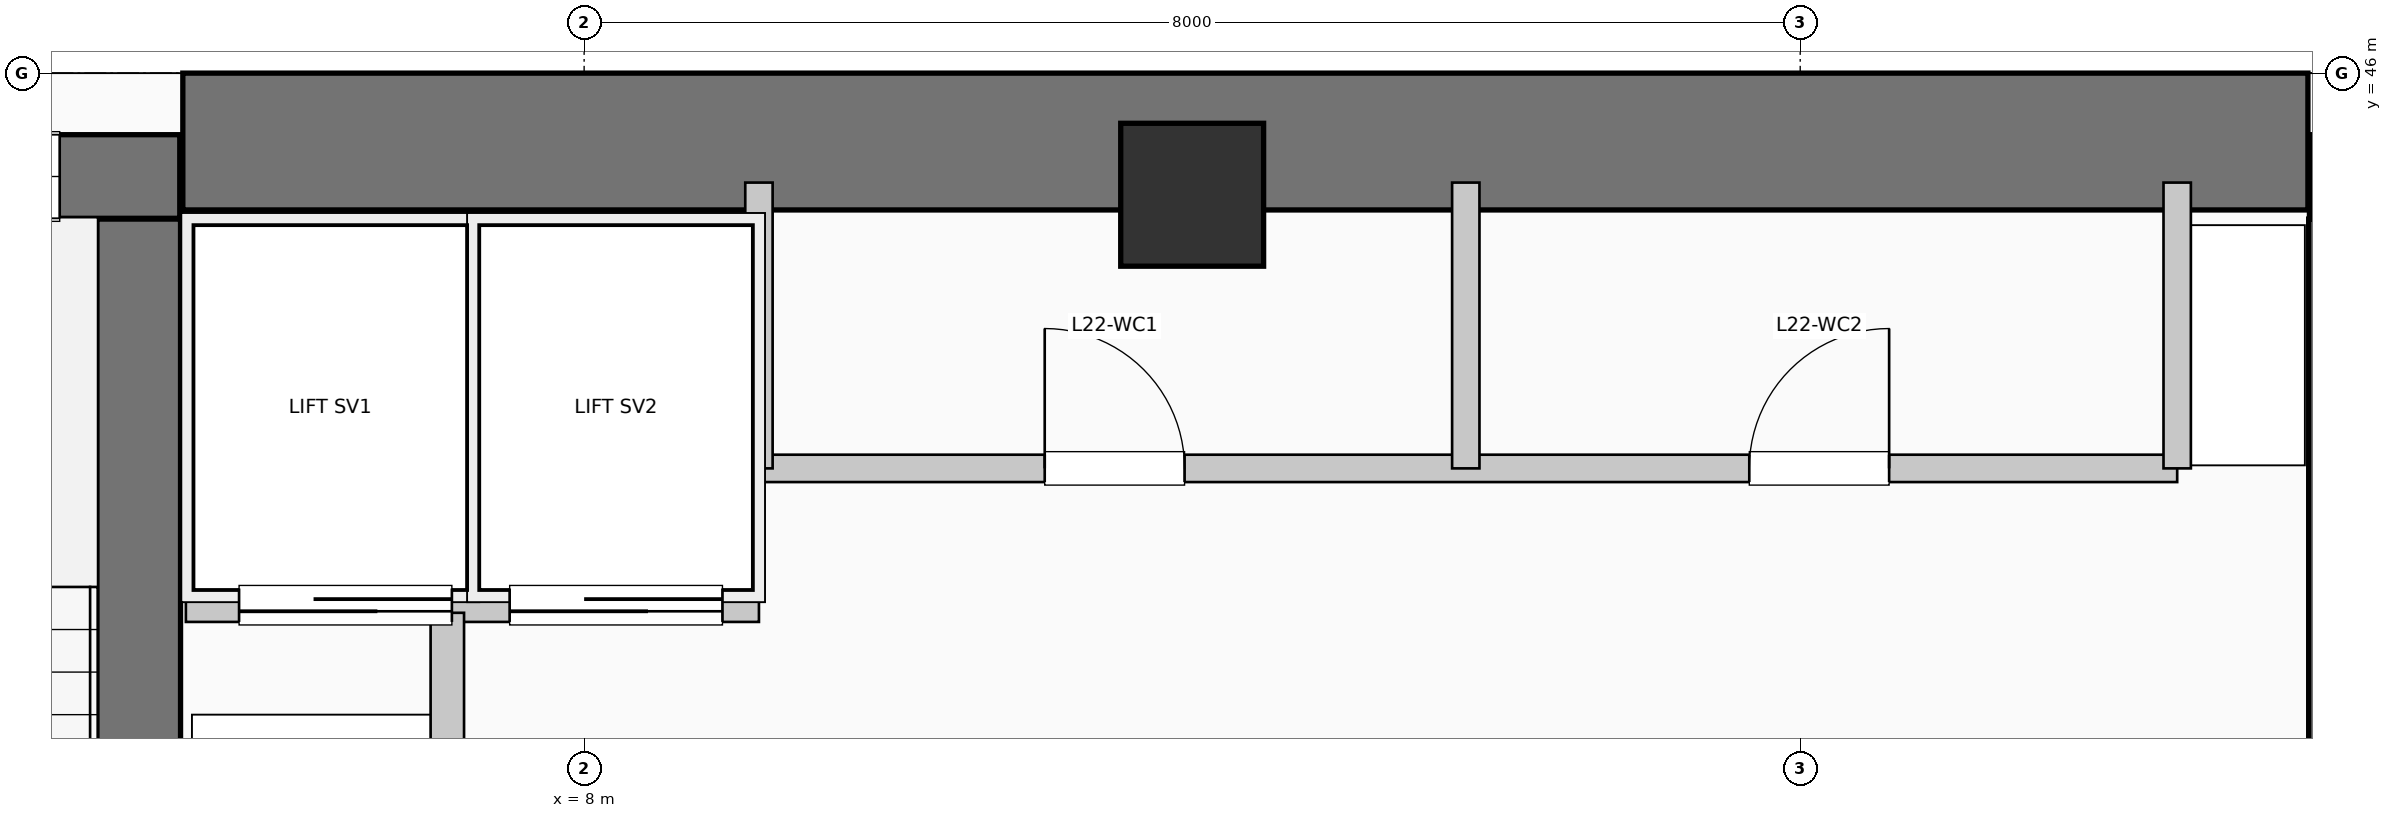
"""IFC4 building model, lengths in metres.
Left out: names, types, materials, properties, quantities, classifications, styles, units other than length and angle.
Written with IfcOpenShell. Run it as: python <this file> out.ifc"""

import sys

from ifc_helpers import new_model, si_unit, direction, frame, frame_2d, origin, origin_2d, place, context, subcontext, project, spatial, rectangle, extrude, element, fill, save


model = new_model("IFC4")
c1 = context("Model", 3, precision=1e-05, world=origin(), true_north=direction((0.0, 1.0)))
c2 = subcontext(c1, "Body", "Model", "MODEL_VIEW")
j1 = project(units=[si_unit("LENGTHUNIT", "METRE"), si_unit("PLANEANGLEUNIT", "RADIAN")], contexts=[c1])
p1 = place(None, origin())
s1 = spatial("IfcSite", under=j1, at=p1, CompositionType="ELEMENT")
p2 = place(p1, origin())
s2 = spatial("IfcBuilding", under=s1, at=p2, CompositionType="ELEMENT")
p3 = place(p2, frame((0.0, 0.0, 93.72)))
s3 = spatial("IfcBuildingStorey", under=s2, at=p3, CompositionType="ELEMENT", Elevation=93.72)
p4 = place(p3, frame((5.36, 45.55, 0.0), z_axis=(0.0, 0.0, 1.0), x_axis=(1.0, 0.0, 0.0)))
e1 = element("IfcWall", 1, at=p4, inside=s3, PredefinedType="SHEAR", context=c2, shape_type="SweptSolid", body=[
    extrude(rectangle(XDim=13.98, YDim=0.9, at=frame_2d((6.99, 0.0))), origin(), (0.0, 0.0, 1.0), 4.95),
])
p5 = place(p3, frame((5.07, 37.15, 0.0), z_axis=(0.0, 0.0, 1.0), x_axis=(0.0, 1.0, 0.0)))
e2 = element("IfcWall", 2, at=p5, inside=s3, PredefinedType="SHEAR", context=c2, shape_type="SweptSolid", body=[
    extrude(rectangle(XDim=7.89, YDim=0.55, at=frame_2d((3.945, 0.0))), origin(), (0.0, 0.0, 1.0), 4.95),
])
p6 = place(p3, frame((1.1, 45.32, 0.0), z_axis=(0.0, 0.0, 1.0), x_axis=(1.0, 0.0, 0.0)))
e3 = element("IfcWall", 3, at=p6, inside=s3, PredefinedType="SHEAR", context=c2, shape_type="SweptSolid", body=[
    extrude(rectangle(XDim=4.24, YDim=0.55, at=frame_2d((2.12, 0.0))), origin(), (0.0, 0.0, 1.0), 4.95),
])
p7 = place(p6, frame((2.05, 0.0, 1.05)))
e4 = element("IfcOpeningElement", 4, at=p7, cuts=e3, PredefinedType="OPENING", context=c2, shape_type="SweptSolid", body=[
    extrude(rectangle(XDim=1.4, YDim=1.8, at=frame_2d((0.7, 0.9))), frame((0.0, 0.285, 0.0), z_axis=(0.0, -1.0, 0.0), x_axis=(1.0, 0.0, 0.0)), (0.0, 0.0, 1.0), 0.57),
])
p8 = place(p3, frame((19.62, 37.15, 0.0), z_axis=(0.0, 0.0, 1.0), x_axis=(0.0, 1.0, 0.0)))
e5 = element("IfcWall", 5, at=p8, inside=s3, PredefinedType="SHEAR", context=c2, shape_type="SweptSolid", body=[
    extrude(rectangle(XDim=7.89, YDim=0.55, at=frame_2d((3.945, 0.0))), origin(), (0.0, 0.0, 1.0), 4.95),
])
p9 = place(p3, frame((19.35, 45.32, 0.0), z_axis=(0.0, 0.0, 1.0), x_axis=(1.0, 0.0, 0.0)))
e6 = element("IfcWall", 6, at=p9, inside=s3, PredefinedType="SHEAR", context=c2, shape_type="SweptSolid", body=[
    extrude(rectangle(XDim=3.69, YDim=0.55, at=frame_2d((1.845, 0.0))), origin(), (0.0, 0.0, 1.0), 4.95),
])
p10 = place(p9, frame((1.15, 0.0, 1.05)))
e7 = element("IfcOpeningElement", 7, at=p10, cuts=e6, PredefinedType="OPENING", context=c2, shape_type="SweptSolid", body=[
    extrude(rectangle(XDim=1.4, YDim=1.8, at=frame_2d((0.7, 0.9))), frame((0.0, 0.285, 0.0), z_axis=(0.0, -1.0, 0.0), x_axis=(1.0, 0.0, 0.0)), (0.0, 0.0, 1.0), 0.57),
])
p11 = place(p3, frame((12.0, 45.2, 0.0), z_axis=(0.0, 0.0, 1.0), x_axis=(1.0, 0.0, 0.0)))
e8 = element("IfcColumn", 8, at=p11, inside=s3, PredefinedType="COLUMN", context=c2, shape_type="SweptSolid", body=[
    extrude(rectangle(XDim=0.94, YDim=0.94, at=origin_2d()), origin(), (0.0, 0.0, 1.0), 4.95),
])
p12 = place(p3, frame((5.38, 42.5, 0.0), z_axis=(0.0, 0.0, 1.0), x_axis=(1.0, 0.0, 0.0)))
e9 = element("IfcWall", 9, at=p12, inside=s3, PredefinedType="PARTITIONING", context=c2, shape_type="SweptSolid", body=[
    extrude(rectangle(XDim=3.77, YDim=0.22, at=frame_2d((1.885, 0.0))), origin(), (0.0, 0.0, 1.0), 4.7),
])
p13 = place(p12, frame((1.75, 0.0, 0.0), z_axis=(0.0, 0.0, 1.0), x_axis=(-1.0, 0.0, 0.0)))
e10 = element("IfcOpeningElement", 10, at=p13, cuts=e9, PredefinedType="OPENING", context=c2, shape_type="SweptSolid", body=[
    extrude(rectangle(XDim=1.4, YDim=2.2, at=frame_2d((0.7, 1.1))), frame((0.0, 0.12, 0.0), z_axis=(0.0, -1.0, 0.0), x_axis=(1.0, 0.0, 0.0)), (0.0, 0.0, 1.0), 0.24),
])
p14 = place(p12, frame((3.53, 0.0, 0.0), z_axis=(0.0, 0.0, 1.0), x_axis=(-1.0, 0.0, 0.0)))
e11 = element("IfcOpeningElement", 11, at=p14, cuts=e9, PredefinedType="OPENING", context=c2, shape_type="SweptSolid", body=[
    extrude(rectangle(XDim=1.4, YDim=2.2, at=frame_2d((0.7, 1.1))), frame((0.0, 0.12, 0.0), z_axis=(0.0, -1.0, 0.0), x_axis=(1.0, 0.0, 0.0)), (0.0, 0.0, 1.0), 0.24),
])
p15 = place(p3, frame((7.1, 39.52, 0.0), z_axis=(0.0, 0.0, 1.0), x_axis=(0.0, 1.0, 0.0)))
e12 = element("IfcWall", 12, at=p15, inside=s3, PredefinedType="PARTITIONING", context=c2, shape_type="SweptSolid", body=[
    extrude(rectangle(XDim=2.93, YDim=0.22, at=frame_2d((1.465, 0.0))), origin(), (0.0, 0.0, 1.0), 4.7),
])
p16 = place(p3, frame((9.15, 43.4, 0.0), z_axis=(0.0, 0.0, 1.0), x_axis=(1.0, 0.0, 0.0)))
e13 = element("IfcWall", 13, at=p16, inside=s3, PredefinedType="PLUMBINGWALL", context=c2, shape_type="SweptSolid", body=[
    extrude(rectangle(XDim=9.33, YDim=0.18, at=frame_2d((4.665, 0.0))), origin(), (0.0, 0.0, 1.0), 4.7),
])
p17 = place(p16, frame((1.88, 0.0, 0.0)))
e14 = element("IfcOpeningElement", 14, at=p17, cuts=e13, PredefinedType="OPENING", context=c2, shape_type="SweptSolid", body=[
    extrude(rectangle(XDim=0.92, YDim=2.1, at=frame_2d((0.46, 1.05))), frame((0.0, 0.1, 0.0), z_axis=(0.0, -1.0, 0.0), x_axis=(1.0, 0.0, 0.0)), (0.0, 0.0, 1.0), 0.2),
])
p18 = place(p16, frame((6.515, 0.0, 0.0)))
e15 = element("IfcOpeningElement", 15, at=p18, cuts=e13, PredefinedType="OPENING", context=c2, shape_type="SweptSolid", body=[
    extrude(rectangle(XDim=0.92, YDim=2.1, at=frame_2d((0.46, 1.05))), frame((0.0, 0.1, 0.0), z_axis=(0.0, -1.0, 0.0), x_axis=(1.0, 0.0, 0.0)), (0.0, 0.0, 1.0), 0.2),
])
for number, where, z_axis, x_axis in (
    (16, (9.15, 43.4, 0.0), (0.0, 0.0, 1.0), (0.0, 1.0, 0.0)),
    (17, (18.48, 43.4, 0.0), (0.0, 0.0, 1.0), (0.0, 1.0, 0.0)),
    (18, (13.8, 43.4, 0.0), (0.0, 0.0, 1.0), (0.0, 1.0, 0.0)),
):
    element("IfcWall", number, at=place(p3, frame(where, z_axis=z_axis, x_axis=x_axis)), inside=s3, PredefinedType="PLUMBINGWALL", context=c2, shape_type="SweptSolid", body=[
        extrude(rectangle(XDim=1.88, YDim=0.18, at=frame_2d((0.94, 0.0))), origin(), (0.0, 0.0, 1.0), 4.7),
    ])
p19 = place(p7, origin())
e19 = element("IfcWindow", 19, at=p19, inside=s3, PartitioningType="SINGLE_PANEL", PredefinedType="WINDOW", context=c2, shape_type="SweptSolid", body=[
    extrude(rectangle(XDim=1.4, YDim=1.8, at=frame_2d((0.7, 0.9))), frame((0.0, 0.03, 0.0), z_axis=(0.0, -1.0, 0.0), x_axis=(1.0, 0.0, 0.0)), (0.0, 0.0, 1.0), 0.06),
])
fill(e4, e19)
p20 = place(p13, origin())
e20 = element("IfcDoor", 20, at=p20, inside=s3, OperationType="SLIDING_TO_LEFT", PredefinedType="DOOR", context=c2, shape_type="SweptSolid", body=[
    extrude(rectangle(XDim=1.4, YDim=2.2, at=frame_2d((0.7, 1.1))), frame((0.0, 0.025, 0.0), z_axis=(0.0, -1.0, 0.0), x_axis=(1.0, 0.0, 0.0)), (0.0, 0.0, 1.0), 0.05),
])
fill(e10, e20)
p21 = place(p14, origin())
e21 = element("IfcDoor", 21, at=p21, inside=s3, OperationType="SLIDING_TO_LEFT", PredefinedType="DOOR", context=c2, shape_type="SweptSolid", body=[
    extrude(rectangle(XDim=1.4, YDim=2.2, at=frame_2d((0.7, 1.1))), frame((0.0, 0.025, 0.0), z_axis=(0.0, -1.0, 0.0), x_axis=(1.0, 0.0, 0.0)), (0.0, 0.0, 1.0), 0.05),
])
fill(e11, e21)
p22 = place(p17, origin())
e22 = element("IfcDoor", 22, at=p22, inside=s3, OperationType="SINGLE_SWING_LEFT", PredefinedType="DOOR", context=c2, shape_type="SweptSolid", body=[
    extrude(rectangle(XDim=0.92, YDim=2.1, at=frame_2d((0.46, 1.05))), frame((0.0, 0.025, 0.0), z_axis=(0.0, -1.0, 0.0), x_axis=(1.0, 0.0, 0.0)), (0.0, 0.0, 1.0), 0.05),
])
fill(e14, e22)
p23 = place(p18, origin())
e23 = element("IfcDoor", 23, at=p23, inside=s3, OperationType="SINGLE_SWING_RIGHT", PredefinedType="DOOR", context=c2, shape_type="SweptSolid", body=[
    extrude(rectangle(XDim=0.92, YDim=2.1, at=frame_2d((0.46, 1.05))), frame((0.0, 0.025, 0.0), z_axis=(0.0, -1.0, 0.0), x_axis=(1.0, 0.0, 0.0)), (0.0, 0.0, 1.0), 0.05),
])
fill(e15, e23)
save(model, sys.argv[1])
